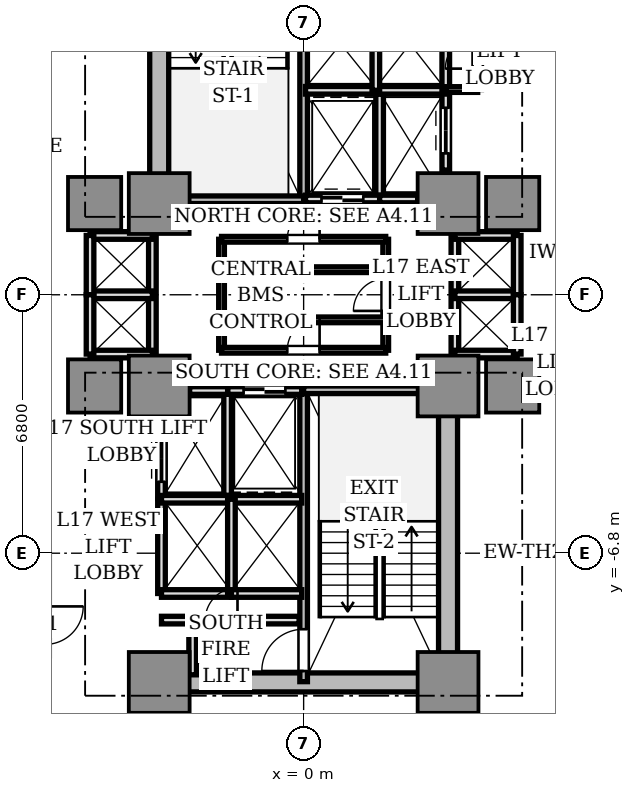
"""IFC4 building model, lengths in metres.
Left out: names, types, materials, properties, quantities, classifications, styles, units other than length and angle.
Written with IfcOpenShell. Run it as: python <this file> out.ifc"""

import sys

from ifc_helpers import new_model, si_unit, direction, frame, frame_2d, origin, origin_2d, place, context, subcontext, project, spatial, rectangle, extrude, source, transform, mapped, element, fill, save


model = new_model("IFC4")
c1 = context("Model", 3, precision=1e-05, world=origin(), true_north=direction((0.0, 1.0)))
c2 = subcontext(c1, "Body", "Model", "MODEL_VIEW")
j1 = project(units=[si_unit("LENGTHUNIT", "METRE"), si_unit("PLANEANGLEUNIT", "RADIAN")], contexts=[c1])
p1 = place(None, origin())
s1 = spatial("IfcSite", under=j1, at=p1, CompositionType="ELEMENT")
p2 = place(p1, origin())
s2 = spatial("IfcBuilding", under=s1, at=p2, CompositionType="ELEMENT")
p3 = place(p2, frame((0.0, 0.0, 64.45)))
s3 = spatial("IfcBuildingStorey", under=s2, at=p3, CompositionType="ELEMENT", Elevation=64.45)
p4 = place(p3, frame((-3.8, 2.85, 0.0), z_axis=(0.0, 0.0, 1.0), x_axis=(0.0, 1.0, 0.0)))
e1 = element("IfcWall", 1, at=p4, inside=s3, PredefinedType="SHEAR", context=c2, shape_type="SweptSolid", body=[
    extrude(rectangle(XDim=6.9, YDim=0.5, at=frame_2d((3.45, 0.0))), origin(), (0.0, 0.0, 1.0), 3.11),
])
p5 = place(p3, frame((-3.55, -10.2, 0.0), z_axis=(0.0, 0.0, 1.0), x_axis=(1.0, 0.0, 0.0)))
e2 = element("IfcWall", 2, at=p5, inside=s3, PredefinedType="SHEAR", context=c2, shape_type="SweptSolid", body=[
    extrude(rectangle(XDim=7.1, YDim=0.5, at=frame_2d((3.55, 0.0))), origin(), (0.0, 0.0, 1.0), 3.11),
])
p6 = place(p3, frame((3.8, -9.75, 0.0), z_axis=(0.0, 0.0, 1.0), x_axis=(0.0, 1.0, 0.0)))
e3 = element("IfcWall", 3, at=p6, inside=s3, PredefinedType="SHEAR", context=c2, shape_type="SweptSolid", body=[
    extrude(rectangle(XDim=6.9, YDim=0.5, at=frame_2d((3.45, 0.0))), origin(), (0.0, 0.0, 1.0), 3.11),
])
m1 = source(origin(), c2, "Body", "SweptSolid", [
    extrude(rectangle(XDim=1.6, YDim=1.6, at=origin_2d()), origin(), (0.0, 0.0, 1.0), 3.11),
])
for number, where, z_axis, x_axis in (
    (4, (-3.8, 2.4, 0.0), (0.0, 0.0, 1.0), (1.0, 0.0, 0.0)),
    (5, (3.8, 2.4, 0.0), (0.0, 0.0, 1.0), (1.0, 0.0, 0.0)),
    (6, (-3.8, -2.4, 0.0), (0.0, 0.0, 1.0), (1.0, 0.0, 0.0)),
    (7, (3.8, -2.4, 0.0), (0.0, 0.0, 1.0), (1.0, 0.0, 0.0)),
    (8, (-3.8, -10.2, 0.0), (0.0, 0.0, 1.0), (1.0, 0.0, 0.0)),
    (9, (3.8, -10.2, 0.0), (0.0, 0.0, 1.0), (1.0, 0.0, 0.0)),
):
    element("IfcColumn", number, at=place(p3, frame(where, z_axis=z_axis, x_axis=x_axis)), inside=s3, PredefinedType="COLUMN", context=c2, shape_type="MappedRepresentation", body=[
        mapped(m1, transform((0.0, 0.0, 0.0), scale=1.0)),
    ])
m2 = source(origin(), c2, "Body", "SweptSolid", [
    extrude(rectangle(XDim=1.4, YDim=1.4, at=origin_2d()), origin(), (0.0, 0.0, 1.0), 3.11),
])
for number, where, z_axis, x_axis in (
    (10, (5.5, 2.4, 0.0), (0.0, 0.0, 1.0), (1.0, 0.0, 0.0)),
    (11, (-5.5, 2.4, 0.0), (0.0, 0.0, 1.0), (1.0, 0.0, 0.0)),
    (12, (5.5, -2.4, 0.0), (0.0, 0.0, 1.0), (1.0, 0.0, 0.0)),
    (13, (-5.5, -2.4, 0.0), (0.0, 0.0, 1.0), (1.0, 0.0, 0.0)),
):
    element("IfcColumn", number, at=place(p3, frame(where, z_axis=z_axis, x_axis=x_axis)), inside=s3, PredefinedType="COLUMN", context=c2, shape_type="MappedRepresentation", body=[
        mapped(m2, transform((0.0, 0.0, 0.0), scale=1.0)),
    ])
p7 = place(p3, frame((0.0, 2.5, 0.0), z_axis=(0.0, 0.0, 1.0), x_axis=(0.0, 1.0, 0.0)))
e14 = element("IfcWall", 14, at=p7, inside=s3, PredefinedType="SOLIDWALL", context=c2, shape_type="SweptSolid", body=[
    extrude(rectangle(XDim=7.68, YDim=0.2, at=frame_2d((3.84, 0.0))), origin(), (0.0, 0.0, 1.0), 3.11),
])
p8 = place(p7, frame((6.5, 0.0, 0.0)))
e15 = element("IfcOpeningElement", 15, at=p8, cuts=e14, PredefinedType="OPENING", context=c2, shape_type="SweptSolid", body=[
    extrude(rectangle(XDim=0.95, YDim=2.15, at=frame_2d((0.475, 1.075))), frame((0.0, 0.11, 0.0), z_axis=(0.0, -1.0, 0.0), x_axis=(1.0, 0.0, 0.0)), (0.0, 0.0, 1.0), 0.22),
])
p9 = place(p3, frame((-3.72, 2.5, 0.0), z_axis=(0.0, 0.0, 1.0), x_axis=(1.0, 0.0, 0.0)))
e16 = element("IfcWall", 16, at=p9, inside=s3, PredefinedType="SOLIDWALL", context=c2, shape_type="SweptSolid", body=[
    extrude(rectangle(XDim=3.72, YDim=0.2, at=frame_2d((1.86, 0.0))), origin(), (0.0, 0.0, 1.0), 3.11),
])
p10 = place(p3, frame((0.0, -10.18, 0.0), z_axis=(0.0, 0.0, 1.0), x_axis=(0.0, 1.0, 0.0)))
e17 = element("IfcWall", 17, at=p10, inside=s3, PredefinedType="SOLIDWALL", context=c2, shape_type="SweptSolid", body=[
    extrude(rectangle(XDim=7.68, YDim=0.2, at=frame_2d((3.84, 0.0))), origin(), (0.0, 0.0, 1.0), 3.11),
])
p11 = place(p10, frame((0.28, 0.0, 0.0)))
e18 = element("IfcOpeningElement", 18, at=p11, cuts=e17, PredefinedType="OPENING", context=c2, shape_type="SweptSolid", body=[
    extrude(rectangle(XDim=1.1, YDim=2.15, at=frame_2d((0.55, 1.075))), frame((0.0, 0.11, 0.0), z_axis=(0.0, -1.0, 0.0), x_axis=(1.0, 0.0, 0.0)), (0.0, 0.0, 1.0), 0.22),
])
p12 = place(p3, frame((0.0, -2.5, 0.0), z_axis=(0.0, 0.0, 1.0), x_axis=(1.0, 0.0, 0.0)))
e19 = element("IfcWall", 19, at=p12, inside=s3, PredefinedType="SOLIDWALL", context=c2, shape_type="SweptSolid", body=[
    extrude(rectangle(XDim=3.72, YDim=0.2, at=frame_2d((1.86, 0.0))), origin(), (0.0, 0.0, 1.0), 3.11),
])
p13 = place(p3, frame((2.0, 2.5, 0.0), z_axis=(0.0, 0.0, 1.0), x_axis=(0.0, 1.0, 0.0)))
e20 = element("IfcWall", 20, at=p13, inside=s3, PredefinedType="SOLIDWALL", context=c2, shape_type="SweptSolid", body=[
    extrude(rectangle(XDim=2.78, YDim=0.2, at=frame_2d((1.39, 0.0))), origin(), (0.0, 0.0, 1.0), 2.66),
])
p14 = place(p3, frame((0.05, 2.52, 0.0), z_axis=(0.0, 0.0, 1.0), x_axis=(1.0, 0.0, 0.0)))
e21 = element("IfcWall", 21, at=p14, inside=s3, PredefinedType="SOLIDWALL", context=c2, shape_type="SweptSolid", body=[
    extrude(rectangle(XDim=1.95, YDim=0.2, at=frame_2d((0.975, 0.0))), origin(), (0.0, 0.0, 1.0), 2.66),
])
p15 = place(p14, frame((0.42, 0.0, 0.0)))
e22 = element("IfcOpeningElement", 22, at=p15, cuts=e21, PredefinedType="OPENING", context=c2, shape_type="SweptSolid", body=[
    extrude(rectangle(XDim=1.1, YDim=2.2, at=frame_2d((0.55, 1.1))), frame((0.0, 0.11, 0.0), z_axis=(0.0, -1.0, 0.0), x_axis=(1.0, 0.0, 0.0)), (0.0, 0.0, 1.0), 0.22),
])
p16 = place(p3, frame((-2.0, -5.28, 0.0), z_axis=(0.0, 0.0, 1.0), x_axis=(0.0, 1.0, 0.0)))
e23 = element("IfcWall", 23, at=p16, inside=s3, PredefinedType="SOLIDWALL", context=c2, shape_type="SweptSolid", body=[
    extrude(rectangle(XDim=2.78, YDim=0.2, at=frame_2d((1.39, 0.0))), origin(), (0.0, 0.0, 1.0), 2.66),
])
p17 = place(p3, frame((-2.0, -2.52, 0.0), z_axis=(0.0, 0.0, 1.0), x_axis=(1.0, 0.0, 0.0)))
e24 = element("IfcWall", 24, at=p17, inside=s3, PredefinedType="SOLIDWALL", context=c2, shape_type="SweptSolid", body=[
    extrude(rectangle(XDim=1.95, YDim=0.2, at=frame_2d((0.975, 0.0))), origin(), (0.0, 0.0, 1.0), 2.66),
])
p18 = place(p17, frame((0.42, 0.0, 0.0)))
e25 = element("IfcOpeningElement", 25, at=p18, cuts=e24, PredefinedType="OPENING", context=c2, shape_type="SweptSolid", body=[
    extrude(rectangle(XDim=1.1, YDim=2.2, at=frame_2d((0.55, 1.1))), frame((0.0, 0.11, 0.0), z_axis=(0.0, -1.0, 0.0), x_axis=(1.0, 0.0, 0.0)), (0.0, 0.0, 1.0), 0.22),
])
p19 = place(p3, frame((2.0, 2.52, 0.0), z_axis=(0.0, 0.0, 1.0), x_axis=(1.0, 0.0, 0.0)))
e26 = element("IfcWall", 26, at=p19, inside=s3, PredefinedType="SOLIDWALL", context=c2, shape_type="SweptSolid", body=[
    extrude(rectangle(XDim=1.0, YDim=0.2, at=frame_2d((0.5, 0.0))), origin(), (0.0, 0.0, 1.0), 2.66),
])
p20 = place(p3, frame((3.74, 3.28, 0.0), z_axis=(0.0, 0.0, 1.0), x_axis=(0.0, 1.0, 0.0)))
e27 = element("IfcWall", 27, at=p20, inside=s3, PredefinedType="SOLIDWALL", context=c2, shape_type="SweptSolid", body=[
    extrude(rectangle(XDim=2.08, YDim=0.2, at=frame_2d((1.04, 0.0))), origin(), (0.0, 0.0, 1.0), 2.66),
])
p21 = place(p20, frame((0.44, 0.0, 0.0)))
e28 = element("IfcOpeningElement", 28, at=p21, cuts=e27, PredefinedType="OPENING", context=c2, shape_type="SweptSolid", body=[
    extrude(rectangle(XDim=1.2, YDim=2.2, at=frame_2d((0.6, 1.1))), frame((0.0, 0.11, 0.0), z_axis=(0.0, -1.0, 0.0), x_axis=(1.0, 0.0, 0.0)), (0.0, 0.0, 1.0), 0.22),
])
p22 = place(p3, frame((-3.0, -2.52, 0.0), z_axis=(0.0, 0.0, 1.0), x_axis=(1.0, 0.0, 0.0)))
e29 = element("IfcWall", 29, at=p22, inside=s3, PredefinedType="SOLIDWALL", context=c2, shape_type="SweptSolid", body=[
    extrude(rectangle(XDim=1.0, YDim=0.2, at=frame_2d((0.5, 0.0))), origin(), (0.0, 0.0, 1.0), 2.66),
])
p23 = place(p3, frame((-3.74, -5.36, 0.0), z_axis=(0.0, 0.0, 1.0), x_axis=(0.0, 1.0, 0.0)))
e30 = element("IfcWall", 30, at=p23, inside=s3, PredefinedType="SOLIDWALL", context=c2, shape_type="SweptSolid", body=[
    extrude(rectangle(XDim=2.08, YDim=0.2, at=frame_2d((1.04, 0.0))), origin(), (0.0, 0.0, 1.0), 2.66),
])
p24 = place(p23, frame((0.44, 0.0, 0.0)))
e31 = element("IfcOpeningElement", 31, at=p24, cuts=e30, PredefinedType="OPENING", context=c2, shape_type="SweptSolid", body=[
    extrude(rectangle(XDim=1.2, YDim=2.2, at=frame_2d((0.6, 1.1))), frame((0.0, 0.11, 0.0), z_axis=(0.0, -1.0, 0.0), x_axis=(1.0, 0.0, 0.0)), (0.0, 0.0, 1.0), 0.22),
])
p25 = place(p3, frame((0.05, 5.38, 0.0), z_axis=(0.0, 0.0, 1.0), x_axis=(1.0, 0.0, 0.0)))
e32 = element("IfcWall", 32, at=p25, inside=s3, PredefinedType="SOLIDWALL", context=c2, shape_type="SweptSolid", body=[
    extrude(rectangle(XDim=3.69, YDim=0.2, at=frame_2d((1.845, 0.0))), origin(), (0.0, 0.0, 1.0), 2.66),
])
for number, where, z_axis, x_axis in (
    (33, (1.9, 5.38, 0.0), (0.0, 0.0, 1.0), (0.0, 1.0, 0.0)),
    (34, (3.74, 5.38, 0.0), (0.0, 0.0, 1.0), (0.0, 1.0, 0.0)),
    (35, (-3.74, -7.86, 0.0), (0.0, 0.0, 1.0), (0.0, 1.0, 0.0)),
):
    element("IfcWall", number, at=place(p3, frame(where, z_axis=z_axis, x_axis=x_axis)), inside=s3, PredefinedType="SOLIDWALL", context=c2, shape_type="SweptSolid", body=[
        extrude(rectangle(XDim=2.48, YDim=0.2, at=frame_2d((1.24, 0.0))), origin(), (0.0, 0.0, 1.0), 2.66),
    ])
p26 = place(p3, frame((-3.74, -7.86, 0.0), z_axis=(0.0, 0.0, 1.0), x_axis=(1.0, 0.0, 0.0)))
e36 = element("IfcWall", 36, at=p26, inside=s3, PredefinedType="SOLIDWALL", context=c2, shape_type="SweptSolid", body=[
    extrude(rectangle(XDim=1.84, YDim=0.2, at=frame_2d((0.92, 0.0))), origin(), (0.0, 0.0, 1.0), 2.66),
])
p27 = place(p3, frame((-3.74, -5.38, 0.0), z_axis=(0.0, 0.0, 1.0), x_axis=(1.0, 0.0, 0.0)))
e37 = element("IfcWall", 37, at=p27, inside=s3, PredefinedType="SOLIDWALL", context=c2, shape_type="SweptSolid", body=[
    extrude(rectangle(XDim=3.69, YDim=0.2, at=frame_2d((1.845, 0.0))), origin(), (0.0, 0.0, 1.0), 2.66),
])
p28 = place(p3, frame((-1.9, -7.86, 0.0), z_axis=(0.0, 0.0, 1.0), x_axis=(0.0, 1.0, 0.0)))
e38 = element("IfcWall", 38, at=p28, inside=s3, PredefinedType="SOLIDWALL", context=c2, shape_type="SweptSolid", body=[
    extrude(rectangle(XDim=2.48, YDim=0.2, at=frame_2d((1.24, 0.0))), origin(), (0.0, 0.0, 1.0), 2.66),
])
p29 = place(p3, frame((-1.9, -7.86, 0.0), z_axis=(0.0, 0.0, 1.0), x_axis=(1.0, 0.0, 0.0)))
e39 = element("IfcWall", 39, at=p29, inside=s3, PredefinedType="SOLIDWALL", context=c2, shape_type="SweptSolid", body=[
    extrude(rectangle(XDim=1.85, YDim=0.2, at=frame_2d((0.925, 0.0))), origin(), (0.0, 0.0, 1.0), 2.66),
])
p30 = place(p3, frame((3.98, -1.56, 0.0), z_axis=(0.0, 0.0, 1.0), x_axis=(0.0, 1.0, 0.0)))
e40 = element("IfcWall", 40, at=p30, inside=s3, PredefinedType="SOLIDWALL", context=c2, shape_type="SweptSolid", body=[
    extrude(rectangle(XDim=3.12, YDim=0.2, at=frame_2d((1.56, 0.0))), origin(), (0.0, 0.0, 1.0), 2.18),
])
for number, where, z_axis, x_axis in (
    (41, (3.98, 1.56, 0.0), (0.0, 0.0, 1.0), (1.0, 0.0, 0.0)),
    (42, (3.98, -1.56, 0.0), (0.0, 0.0, 1.0), (1.0, 0.0, 0.0)),
    (43, (3.98, 0.0, 0.0), (0.0, 0.0, 1.0), (1.0, 0.0, 0.0)),
):
    element("IfcWall", number, at=place(p3, frame(where, z_axis=z_axis, x_axis=x_axis)), inside=s3, PredefinedType="SOLIDWALL", context=c2, shape_type="SweptSolid", body=[
        extrude(rectangle(XDim=1.64, YDim=0.2, at=frame_2d((0.82, 0.0))), origin(), (0.0, 0.0, 1.0), 2.66),
    ])
for number, where, z_axis, x_axis in (
    (44, (5.62, 0.0, 0.0), (0.0, 0.0, 1.0), (0.0, 1.0, 0.0)),
    (45, (5.62, -1.56, 0.0), (0.0, 0.0, 1.0), (0.0, 1.0, 0.0)),
):
    element("IfcWall", number, at=place(p3, frame(where, z_axis=z_axis, x_axis=x_axis)), inside=s3, PredefinedType="SOLIDWALL", context=c2, shape_type="SweptSolid", body=[
        extrude(rectangle(XDim=1.56, YDim=0.2, at=frame_2d((0.78, 0.0))), origin(), (0.0, 0.0, 1.0), 2.66),
    ])
p31 = place(p3, frame((-3.98, -1.56, 0.0), z_axis=(0.0, 0.0, 1.0), x_axis=(0.0, 1.0, 0.0)))
e46 = element("IfcWall", 46, at=p31, inside=s3, PredefinedType="SOLIDWALL", context=c2, shape_type="SweptSolid", body=[
    extrude(rectangle(XDim=3.12, YDim=0.2, at=frame_2d((1.56, 0.0))), origin(), (0.0, 0.0, 1.0), 2.18),
])
for number, where, z_axis, x_axis in (
    (47, (-5.62, 1.56, 0.0), (0.0, 0.0, 1.0), (1.0, 0.0, 0.0)),
    (48, (-5.62, -1.56, 0.0), (0.0, 0.0, 1.0), (1.0, 0.0, 0.0)),
    (49, (-5.62, 0.0, 0.0), (0.0, 0.0, 1.0), (1.0, 0.0, 0.0)),
):
    element("IfcWall", number, at=place(p3, frame(where, z_axis=z_axis, x_axis=x_axis)), inside=s3, PredefinedType="SOLIDWALL", context=c2, shape_type="SweptSolid", body=[
        extrude(rectangle(XDim=1.64, YDim=0.2, at=frame_2d((0.82, 0.0))), origin(), (0.0, 0.0, 1.0), 2.66),
    ])
for number, where, z_axis, x_axis in (
    (50, (-5.62, 0.0, 0.0), (0.0, 0.0, 1.0), (0.0, 1.0, 0.0)),
    (51, (-5.62, -1.56, 0.0), (0.0, 0.0, 1.0), (0.0, 1.0, 0.0)),
):
    element("IfcWall", number, at=place(p3, frame(where, z_axis=z_axis, x_axis=x_axis)), inside=s3, PredefinedType="SOLIDWALL", context=c2, shape_type="SweptSolid", body=[
        extrude(rectangle(XDim=1.56, YDim=0.2, at=frame_2d((0.78, 0.0))), origin(), (0.0, 0.0, 1.0), 2.66),
    ])
p32 = place(p3, frame((-3.74, -8.56, 0.0), z_axis=(0.0, 0.0, 1.0), x_axis=(1.0, 0.0, 0.0)))
e52 = element("IfcWall", 52, at=p32, inside=s3, PredefinedType="SOLIDWALL", context=c2, shape_type="SweptSolid", body=[
    extrude(rectangle(XDim=3.62, YDim=0.2, at=frame_2d((1.81, 0.0))), origin(), (0.0, 0.0, 1.0), 2.66),
])
p33 = place(p32, frame((1.15, 0.0, 0.0)))
e53 = element("IfcOpeningElement", 53, at=p33, cuts=e52, PredefinedType="OPENING", context=c2, shape_type="SweptSolid", body=[
    extrude(rectangle(XDim=0.85, YDim=2.1, at=frame_2d((0.425, 1.05))), frame((0.0, 0.11, 0.0), z_axis=(0.0, -1.0, 0.0), x_axis=(1.0, 0.0, 0.0)), (0.0, 0.0, 1.0), 0.22),
])
p34 = place(p3, frame((-2.92, -10.0, 0.0), z_axis=(0.0, 0.0, 1.0), x_axis=(0.0, 1.0, 0.0)))
e54 = element("IfcWall", 54, at=p34, inside=s3, PredefinedType="SOLIDWALL", context=c2, shape_type="SweptSolid", body=[
    extrude(rectangle(XDim=1.44, YDim=0.2, at=frame_2d((0.72, 0.0))), origin(), (0.0, 0.0, 1.0), 2.66),
])
p35 = place(p3, frame((4.58, 5.4, 0.0), z_axis=(0.0, 0.0, 1.0), x_axis=(0.0, 1.0, 0.0)))
e55 = element("IfcWall", 55, at=p35, inside=s3, PredefinedType="SOLIDWALL", context=c2, shape_type="SweptSolid", body=[
    extrude(rectangle(XDim=2.46, YDim=0.2, at=frame_2d((1.23, 0.0))), origin(), (0.0, 0.0, 1.0), 2.66),
])
p36 = place(p35, frame((0.55, 0.0, 0.0)))
e56 = element("IfcOpeningElement", 56, at=p36, cuts=e55, PredefinedType="OPENING", context=c2, shape_type="SweptSolid", body=[
    extrude(rectangle(XDim=0.85, YDim=2.1, at=frame_2d((0.425, 1.05))), frame((0.0, 0.11, 0.0), z_axis=(0.0, -1.0, 0.0), x_axis=(1.0, 0.0, 0.0)), (0.0, 0.0, 1.0), 0.22),
])
p37 = place(p3, frame((3.74, 5.4, 0.0), z_axis=(0.0, 0.0, 1.0), x_axis=(1.0, 0.0, 0.0)))
e57 = element("IfcWall", 57, at=p37, inside=s3, PredefinedType="PARTITIONING", context=c2, shape_type="SweptSolid", body=[
    extrude(rectangle(XDim=0.84, YDim=0.15, at=frame_2d((0.42, 0.0))), origin(), (0.0, 0.0, 1.0), 2.66),
])
p38 = place(p3, frame((2.16, -1.46, 0.0), z_axis=(0.0, 0.0, 1.0), x_axis=(0.0, 1.0, 0.0)))
e58 = element("IfcWall", 58, at=p38, inside=s3, PredefinedType="PARTITIONING", context=c2, shape_type="SweptSolid", body=[
    extrude(rectangle(XDim=2.92, YDim=0.15, at=frame_2d((1.46, 0.0))), origin(), (0.0, 0.0, 1.0), 2.66),
])
p39 = place(p38, frame((1.035, 0.0, 0.0)))
e59 = element("IfcOpeningElement", 59, at=p39, cuts=e58, PredefinedType="OPENING", context=c2, shape_type="SweptSolid", body=[
    extrude(rectangle(XDim=0.85, YDim=2.1, at=frame_2d((0.425, 1.05))), frame((0.0, 0.085, 0.0), z_axis=(0.0, -1.0, 0.0), x_axis=(1.0, 0.0, 0.0)), (0.0, 0.0, 1.0), 0.17),
])
p40 = place(p3, frame((-2.16, -1.46, 0.0), z_axis=(0.0, 0.0, 1.0), x_axis=(0.0, 1.0, 0.0)))
e60 = element("IfcWall", 60, at=p40, inside=s3, PredefinedType="PARTITIONING", context=c2, shape_type="SweptSolid", body=[
    extrude(rectangle(XDim=2.92, YDim=0.15, at=frame_2d((1.46, 0.0))), origin(), (0.0, 0.0, 1.0), 2.66),
])
p41 = place(p3, frame((-2.16, 1.46, 0.0), z_axis=(0.0, 0.0, 1.0), x_axis=(1.0, 0.0, 0.0)))
e61 = element("IfcWall", 61, at=p41, inside=s3, PredefinedType="PARTITIONING", context=c2, shape_type="SweptSolid", body=[
    extrude(rectangle(XDim=4.32, YDim=0.15, at=frame_2d((2.16, 0.0))), origin(), (0.0, 0.0, 1.0), 2.66),
])
p42 = place(p41, frame((1.73, 0.0, 0.0)))
e62 = element("IfcOpeningElement", 62, at=p42, cuts=e61, PredefinedType="OPENING", context=c2, shape_type="SweptSolid", body=[
    extrude(rectangle(XDim=0.85, YDim=2.1, at=frame_2d((0.425, 1.05))), frame((0.0, 0.085, 0.0), z_axis=(0.0, -1.0, 0.0), x_axis=(1.0, 0.0, 0.0)), (0.0, 0.0, 1.0), 0.17),
])
p43 = place(p3, frame((-2.16, -1.46, 0.0), z_axis=(0.0, 0.0, 1.0), x_axis=(1.0, 0.0, 0.0)))
e63 = element("IfcWall", 63, at=p43, inside=s3, PredefinedType="PARTITIONING", context=c2, shape_type="SweptSolid", body=[
    extrude(rectangle(XDim=4.32, YDim=0.15, at=frame_2d((2.16, 0.0))), origin(), (0.0, 0.0, 1.0), 2.66),
])
p44 = place(p43, frame((1.73, 0.0, 0.0)))
e64 = element("IfcOpeningElement", 64, at=p44, cuts=e63, PredefinedType="OPENING", context=c2, shape_type="SweptSolid", body=[
    extrude(rectangle(XDim=0.85, YDim=2.1, at=frame_2d((0.425, 1.05))), frame((0.0, 0.085, 0.0), z_axis=(0.0, -1.0, 0.0), x_axis=(1.0, 0.0, 0.0)), (0.0, 0.0, 1.0), 0.17),
])
for number, where, z_axis, x_axis in (
    (65, (-2.16, 0.66, 0.0), (0.0, 0.0, 1.0), (1.0, 0.0, 0.0)),
    (66, (-2.16, -0.66, 0.0), (0.0, 0.0, 1.0), (1.0, 0.0, 0.0)),
):
    element("IfcWall", number, at=place(p3, frame(where, z_axis=z_axis, x_axis=x_axis)), inside=s3, PredefinedType="PARTITIONING", context=c2, shape_type="SweptSolid", body=[
        extrude(rectangle(XDim=4.32, YDim=0.15, at=frame_2d((2.16, 0.0))), origin(), (0.0, 0.0, 1.0), 2.66),
    ])
m3 = source(origin(), c2, "Body", "SweptSolid", [
    extrude(rectangle(XDim=1.1, YDim=0.05, at=origin_2d()), origin(), (0.0, 0.0, 1.0), 2.2),
])
p45 = place(p15, frame((0.55, 0.0, 0.0)))
e67 = element("IfcDoor", 67, at=p45, inside=s3, OperationType="DOUBLE_DOOR_SLIDING", PredefinedType="DOOR", context=c2, shape_type="MappedRepresentation", body=[
    mapped(m3, transform((0.0, 0.0, 0.0), scale=1.0)),
])
fill(e22, e67)
p46 = place(p18, frame((0.55, 0.0, 0.0)))
e68 = element("IfcDoor", 68, at=p46, inside=s3, OperationType="DOUBLE_DOOR_SLIDING", PredefinedType="DOOR", context=c2, shape_type="MappedRepresentation", body=[
    mapped(m3, transform((0.0, 0.0, 0.0), scale=1.0)),
])
fill(e25, e68)
m4 = source(origin(), c2, "Body", "SweptSolid", [
    extrude(rectangle(XDim=1.2, YDim=0.05, at=origin_2d()), origin(), (0.0, 0.0, 1.0), 2.2),
])
p47 = place(p21, frame((0.6, 0.0, 0.0)))
e69 = element("IfcDoor", 69, at=p47, inside=s3, OperationType="DOUBLE_DOOR_SLIDING", PredefinedType="DOOR", context=c2, shape_type="MappedRepresentation", body=[
    mapped(m4, transform((0.0, 0.0, 0.0), scale=1.0)),
])
fill(e28, e69)
p48 = place(p24, frame((0.6, 0.0, 0.0)))
e70 = element("IfcDoor", 70, at=p48, inside=s3, OperationType="DOUBLE_DOOR_SLIDING", PredefinedType="DOOR", context=c2, shape_type="MappedRepresentation", body=[
    mapped(m4, transform((0.0, 0.0, 0.0), scale=1.0)),
])
fill(e31, e70)
m5 = source(origin(), c2, "Body", "SweptSolid", [
    extrude(rectangle(XDim=1.1, YDim=0.05, at=origin_2d()), origin(), (0.0, 0.0, 1.0), 2.15),
])
p49 = place(p11, frame((0.55, 0.0, 0.0)))
e71 = element("IfcDoor", 71, at=p49, inside=s3, OperationType="SINGLE_SWING_LEFT", PredefinedType="DOOR", context=c2, shape_type="MappedRepresentation", body=[
    mapped(m5, transform((0.0, 0.0, 0.0), scale=1.0)),
])
fill(e18, e71)
m6 = source(origin(), c2, "Body", "SweptSolid", [
    extrude(rectangle(XDim=0.85, YDim=0.05, at=origin_2d()), origin(), (0.0, 0.0, 1.0), 2.1),
])
p50 = place(p33, frame((0.425, 0.0, 0.0)))
e72 = element("IfcDoor", 72, at=p50, inside=s3, OperationType="SINGLE_SWING_RIGHT", PredefinedType="DOOR", context=c2, shape_type="MappedRepresentation", body=[
    mapped(m6, transform((0.0, 0.0, 0.0), scale=1.0)),
])
fill(e53, e72)
p51 = place(p36, frame((0.425, 0.0, 0.0)))
e73 = element("IfcDoor", 73, at=p51, inside=s3, OperationType="SINGLE_SWING_LEFT", PredefinedType="DOOR", context=c2, shape_type="MappedRepresentation", body=[
    mapped(m6, transform((0.0, 0.0, 0.0), scale=1.0)),
])
fill(e56, e73)
p52 = place(p42, frame((0.425, 0.0, 0.0)))
e74 = element("IfcDoor", 74, at=p52, inside=s3, OperationType="SINGLE_SWING_RIGHT", PredefinedType="DOOR", context=c2, shape_type="MappedRepresentation", body=[
    mapped(m6, transform((0.0, 0.0, 0.0), scale=1.0)),
])
fill(e62, e74)
p53 = place(p39, frame((0.425, 0.0, 0.0)))
e75 = element("IfcDoor", 75, at=p53, inside=s3, OperationType="SINGLE_SWING_LEFT", PredefinedType="DOOR", context=c2, shape_type="MappedRepresentation", body=[
    mapped(m6, transform((0.0, 0.0, 0.0), scale=1.0)),
])
fill(e59, e75)
p54 = place(p44, frame((0.425, 0.0, 0.0)))
e76 = element("IfcDoor", 76, at=p54, inside=s3, OperationType="SINGLE_SWING_RIGHT", PredefinedType="DOOR", context=c2, shape_type="MappedRepresentation", body=[
    mapped(m6, transform((0.0, 0.0, 0.0), scale=1.0)),
])
fill(e64, e76)
save(model, sys.argv[1])
